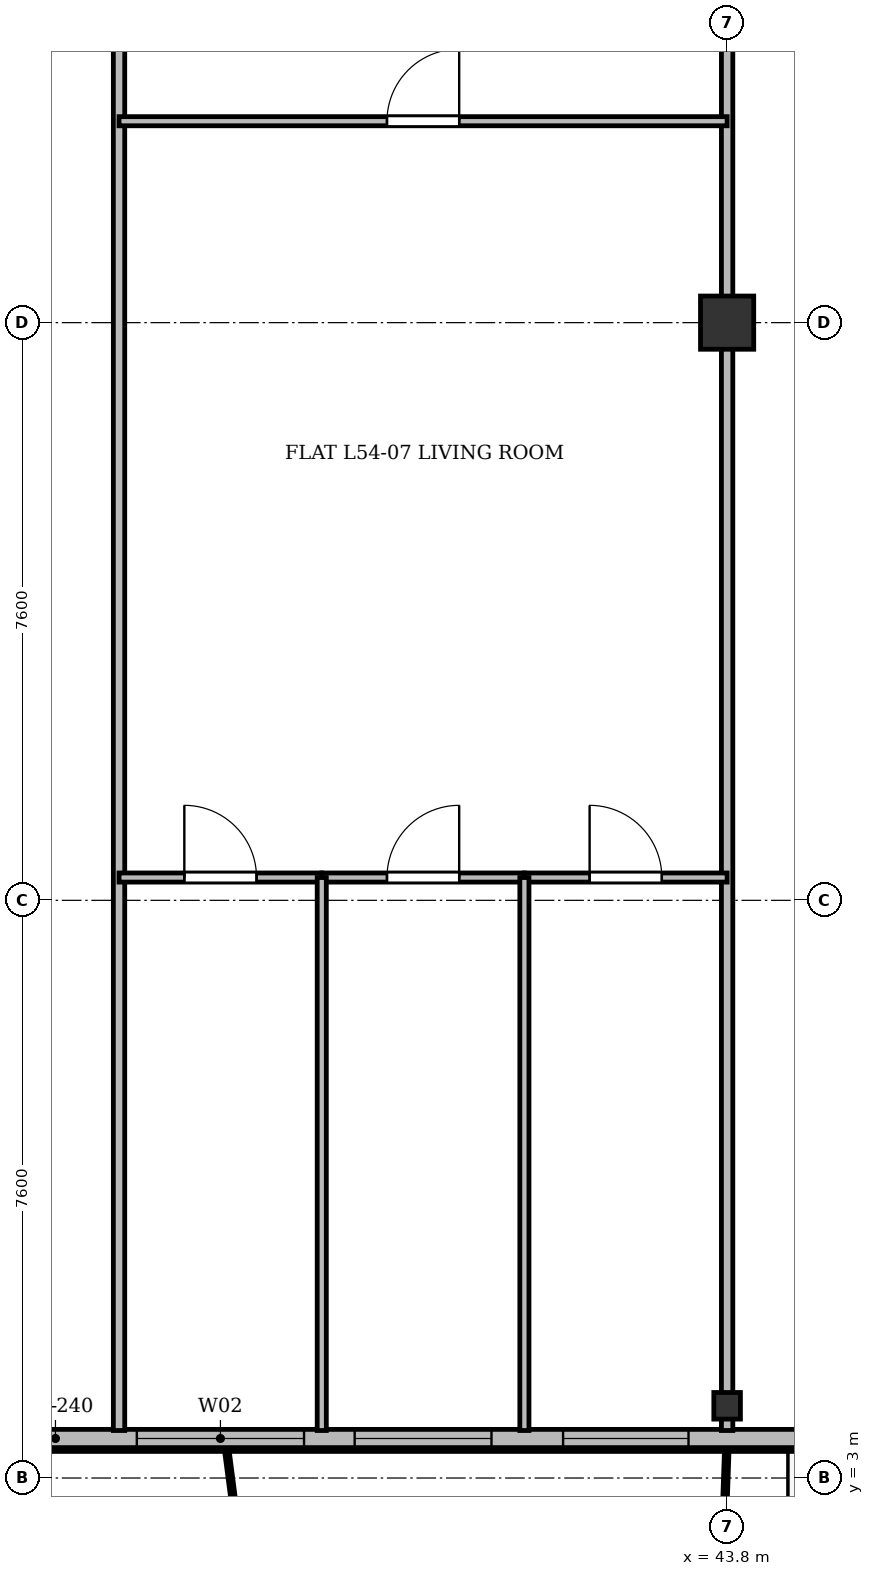
"""IFC4 building model, lengths in metres.
Left out: names, types, materials, properties, quantities, classifications, styles, units other than length and angle.
Written with IfcOpenShell. Run it as: python <this file> out.ifc"""

import sys

from ifc_helpers import new_model, si_unit, direction, frame, frame_2d, origin, origin_2d, place, context, subcontext, project, spatial, rectangle, i_section, extrude, source, transform, mapped, element, fill, save


model = new_model("IFC4")
c1 = context("Model", 3, precision=1e-05, world=origin(), true_north=direction((0.0, 1.0)))
c2 = subcontext(c1, "Body", "Model", "MODEL_VIEW")
j1 = project(units=[si_unit("LENGTHUNIT", "METRE"), si_unit("PLANEANGLEUNIT", "RADIAN")], contexts=[c1])
p1 = place(None, origin())
s1 = spatial("IfcSite", under=j1, at=p1, CompositionType="ELEMENT")
p2 = place(p1, origin())
s2 = spatial("IfcBuilding", under=s1, at=p2, CompositionType="ELEMENT")
p3 = place(p2, frame((0.0, 0.0, 208.5)))
s3 = spatial("IfcBuildingStorey", under=s2, at=p3, CompositionType="ELEMENT", Elevation=208.5)
m1 = source(origin(), c2, "Body", "SweptSolid", [
    extrude(i_section(OverallWidth=0.35, OverallDepth=0.35, WebThickness=0.018, FlangeThickness=0.028, at=origin_2d()), origin(), (0.0, 0.0, 1.0), 3.6),
])
p4 = place(p3, frame((43.8, 3.95, 0.0), z_axis=(0.0, 0.0, 1.0), x_axis=(1.0, 0.0, 0.0)))
e1 = element("IfcColumn", 1, at=p4, inside=s3, PredefinedType="COLUMN", context=c2, shape_type="MappedRepresentation", body=[
    mapped(m1, transform((0.0, 0.0, 0.0), x_axis=(1.0, 0.0, 0.0), y_axis=(0.0, 1.0, 0.0), z_axis=(0.0, 0.0, 1.0), scale=1.0)),
])
m2 = source(origin(), c2, "Body", "SweptSolid", [
    extrude(rectangle(XDim=0.7, YDim=0.7, at=origin_2d()), origin(), (0.0, 0.0, 1.0), 3.6),
])
p5 = place(p3, frame((43.8, 18.2, 0.0), z_axis=(0.0, 0.0, 1.0), x_axis=(1.0, 0.0, 0.0)))
e2 = element("IfcColumn", 2, at=p5, inside=s3, PredefinedType="COLUMN", context=c2, shape_type="MappedRepresentation", body=[
    mapped(m2, transform((0.0, 0.0, 0.0), x_axis=(1.0, 0.0, 0.0), y_axis=(0.0, 1.0, 0.0), z_axis=(0.0, 0.0, 1.0), scale=1.0)),
])
p6 = place(p3, frame((63.4, 3.52, 0.0), z_axis=(0.0, 0.0, 1.0), x_axis=(-1.0, 0.0, 0.0)))
e3 = element("IfcWall", 3, at=p6, inside=s3, PredefinedType="SOLIDWALL", context=c2, shape_type="SweptSolid", body=[
    extrude(rectangle(XDim=52.4, YDim=0.24, at=frame_2d((26.2, 0.0))), origin(), (0.0, 0.0, 1.0), 3.36),
])
p7 = place(p6, frame((1.52, 0.0, 0.9)))
e4 = element("IfcOpeningElement", 4, at=p7, cuts=e3, PredefinedType="OPENING", context=c2, shape_type="SweptSolid", body=[
    extrude(rectangle(XDim=1.65, YDim=1.85, at=frame_2d((0.825, 0.925))), frame((0.0, 0.13, 0.0), z_axis=(0.0, -1.0, 0.0), x_axis=(1.0, 0.0, 0.0)), (0.0, 0.0, 1.0), 0.26),
])
p8 = place(p6, frame((5.0, 0.0, 0.9)))
e5 = element("IfcOpeningElement", 5, at=p8, cuts=e3, PredefinedType="OPENING", context=c2, shape_type="SweptSolid", body=[
    extrude(rectangle(XDim=1.8, YDim=1.8, at=frame_2d((0.9, 0.9))), frame((0.0, 0.13, 0.0), z_axis=(0.0, -1.0, 0.0), x_axis=(1.0, 0.0, 0.0)), (0.0, 0.0, 1.0), 0.26),
])
p9 = place(p6, frame((7.45, 0.0, 0.9)))
e6 = element("IfcOpeningElement", 6, at=p9, cuts=e3, PredefinedType="OPENING", context=c2, shape_type="SweptSolid", body=[
    extrude(rectangle(XDim=1.5, YDim=1.75, at=frame_2d((0.75, 0.875))), frame((0.0, 0.13, 0.0), z_axis=(0.0, -1.0, 0.0), x_axis=(1.0, 0.0, 0.0)), (0.0, 0.0, 1.0), 0.26),
])
p10 = place(p6, frame((10.05, 0.0, 0.9)))
e7 = element("IfcOpeningElement", 7, at=p10, cuts=e3, PredefinedType="OPENING", context=c2, shape_type="SweptSolid", body=[
    extrude(rectangle(XDim=1.5, YDim=1.75, at=frame_2d((0.75, 0.875))), frame((0.0, 0.13, 0.0), z_axis=(0.0, -1.0, 0.0), x_axis=(1.0, 0.0, 0.0)), (0.0, 0.0, 1.0), 0.26),
])
p11 = place(p6, frame((14.217, 0.0, 0.0)))
e8 = element("IfcOpeningElement", 8, at=p11, cuts=e3, PredefinedType="OPENING", context=c2, shape_type="SweptSolid", body=[
    extrude(rectangle(XDim=1.2, YDim=2.2, at=frame_2d((0.6, 1.1))), frame((0.0, 0.13, 0.0), z_axis=(0.0, -1.0, 0.0), x_axis=(1.0, 0.0, 0.0)), (0.0, 0.0, 1.0), 0.26),
])
p12 = place(p6, frame((20.108, 0.0, 0.9)))
e9 = element("IfcOpeningElement", 9, at=p12, cuts=e3, PredefinedType="OPENING", context=c2, shape_type="SweptSolid", body=[
    extrude(rectangle(XDim=1.65, YDim=1.85, at=frame_2d((0.825, 0.925))), frame((0.0, 0.13, 0.0), z_axis=(0.0, -1.0, 0.0), x_axis=(1.0, 0.0, 0.0)), (0.0, 0.0, 1.0), 0.26),
])
p13 = place(p6, frame((22.7, 0.0, 0.9)))
e10 = element("IfcOpeningElement", 10, at=p13, cuts=e3, PredefinedType="OPENING", context=c2, shape_type="SweptSolid", body=[
    extrude(rectangle(XDim=1.8, YDim=1.8, at=frame_2d((0.9, 0.9))), frame((0.0, 0.13, 0.0), z_axis=(0.0, -1.0, 0.0), x_axis=(1.0, 0.0, 0.0)), (0.0, 0.0, 1.0), 0.26),
])
p14 = place(p6, frame((25.166, 0.0, 0.9)))
e11 = element("IfcOpeningElement", 11, at=p14, cuts=e3, PredefinedType="OPENING", context=c2, shape_type="SweptSolid", body=[
    extrude(rectangle(XDim=2.2, YDim=1.8, at=frame_2d((1.1, 0.9))), frame((0.0, 0.13, 0.0), z_axis=(0.0, -1.0, 0.0), x_axis=(1.0, 0.0, 0.0)), (0.0, 0.0, 1.0), 0.26),
])
p15 = place(p6, frame((29.45, 0.0, 0.9)))
e12 = element("IfcOpeningElement", 12, at=p15, cuts=e3, PredefinedType="OPENING", context=c2, shape_type="SweptSolid", body=[
    extrude(rectangle(XDim=1.5, YDim=1.75, at=frame_2d((0.75, 0.875))), frame((0.0, 0.13, 0.0), z_axis=(0.0, -1.0, 0.0), x_axis=(1.0, 0.0, 0.0)), (0.0, 0.0, 1.0), 0.26),
])
p16 = place(p6, frame((33.0, 0.0, 0.9)))
e13 = element("IfcOpeningElement", 13, at=p16, cuts=e3, PredefinedType="OPENING", context=c2, shape_type="SweptSolid", body=[
    extrude(rectangle(XDim=2.0, YDim=1.95, at=frame_2d((1.0, 0.975))), frame((0.0, 0.13, 0.0), z_axis=(0.0, -1.0, 0.0), x_axis=(1.0, 0.0, 0.0)), (0.0, 0.0, 1.0), 0.26),
])
p17 = place(p6, frame((35.575, 0.0, 0.9)))
e14 = element("IfcOpeningElement", 14, at=p17, cuts=e3, PredefinedType="OPENING", context=c2, shape_type="SweptSolid", body=[
    extrude(rectangle(XDim=1.65, YDim=1.85, at=frame_2d((0.825, 0.925))), frame((0.0, 0.13, 0.0), z_axis=(0.0, -1.0, 0.0), x_axis=(1.0, 0.0, 0.0)), (0.0, 0.0, 1.0), 0.26),
])
p18 = place(p6, frame((37.9, 0.0, 0.9)))
e15 = element("IfcOpeningElement", 15, at=p18, cuts=e3, PredefinedType="OPENING", context=c2, shape_type="SweptSolid", body=[
    extrude(rectangle(XDim=1.8, YDim=1.8, at=frame_2d((0.9, 0.9))), frame((0.0, 0.13, 0.0), z_axis=(0.0, -1.0, 0.0), x_axis=(1.0, 0.0, 0.0)), (0.0, 0.0, 1.0), 0.26),
])
p19 = place(p6, frame((41.456, 0.0, 0.0)))
e16 = element("IfcOpeningElement", 16, at=p19, cuts=e3, PredefinedType="OPENING", context=c2, shape_type="SweptSolid", body=[
    extrude(rectangle(XDim=1.2, YDim=2.2, at=frame_2d((0.6, 1.1))), frame((0.0, 0.13, 0.0), z_axis=(0.0, -1.0, 0.0), x_axis=(1.0, 0.0, 0.0)), (0.0, 0.0, 1.0), 0.26),
])
p20 = place(p6, frame((43.45, 0.0, 0.9)))
e17 = element("IfcOpeningElement", 17, at=p20, cuts=e3, PredefinedType="OPENING", context=c2, shape_type="SweptSolid", body=[
    extrude(rectangle(XDim=1.5, YDim=1.75, at=frame_2d((0.75, 0.875))), frame((0.0, 0.13, 0.0), z_axis=(0.0, -1.0, 0.0), x_axis=(1.0, 0.0, 0.0)), (0.0, 0.0, 1.0), 0.26),
])
p21 = place(p6, frame((45.5, 0.0, 0.9)))
e18 = element("IfcOpeningElement", 18, at=p21, cuts=e3, PredefinedType="OPENING", context=c2, shape_type="SweptSolid", body=[
    extrude(rectangle(XDim=2.0, YDim=1.95, at=frame_2d((1.0, 0.975))), frame((0.0, 0.13, 0.0), z_axis=(0.0, -1.0, 0.0), x_axis=(1.0, 0.0, 0.0)), (0.0, 0.0, 1.0), 0.26),
])
p22 = place(p6, frame((49.23, 0.0, 0.9)))
e19 = element("IfcOpeningElement", 19, at=p22, cuts=e3, PredefinedType="OPENING", context=c2, shape_type="SweptSolid", body=[
    extrude(rectangle(XDim=1.65, YDim=1.85, at=frame_2d((0.825, 0.925))), frame((0.0, 0.13, 0.0), z_axis=(0.0, -1.0, 0.0), x_axis=(1.0, 0.0, 0.0)), (0.0, 0.0, 1.0), 0.26),
])
p23 = place(p3, frame((35.8, 3.625, 0.0), z_axis=(0.0, 0.0, 1.0), x_axis=(0.0, 1.0, 0.0)))
e20 = element("IfcWall", 20, at=p23, inside=s3, PredefinedType="PARTITIONING", context=c2, shape_type="SweptSolid", body=[
    extrude(rectangle(XDim=27.175, YDim=0.15, at=frame_2d((13.587, 0.0))), origin(), (0.0, 0.0, 1.0), 2.91),
])
p24 = place(p3, frame((43.8, 3.625, 0.0), z_axis=(0.0, 0.0, 1.0), x_axis=(0.0, 1.0, 0.0)))
e21 = element("IfcWall", 21, at=p24, inside=s3, PredefinedType="PARTITIONING", context=c2, shape_type="SweptSolid", body=[
    extrude(rectangle(XDim=27.175, YDim=0.15, at=frame_2d((13.587, 0.0))), origin(), (0.0, 0.0, 1.0), 2.86),
])
p25 = place(p3, frame((35.8, 20.85, 0.0), z_axis=(0.0, 0.0, 1.0), x_axis=(1.0, 0.0, 0.0)))
e22 = element("IfcWall", 22, at=p25, inside=s3, PredefinedType="PARTITIONING", context=c2, shape_type="SweptSolid", body=[
    extrude(rectangle(XDim=8.0, YDim=0.12, at=frame_2d((4.0, 0.0))), origin(), (0.0, 0.0, 1.0), 2.86),
])
p26 = place(p25, frame((3.525, 0.0, 0.0)))
e23 = element("IfcOpeningElement", 23, at=p26, cuts=e22, PredefinedType="OPENING", context=c2, shape_type="SweptSolid", body=[
    extrude(rectangle(XDim=0.95, YDim=2.15, at=frame_2d((0.475, 1.075))), frame((0.0, 0.07, 0.0), z_axis=(0.0, -1.0, 0.0), x_axis=(1.0, 0.0, 0.0)), (0.0, 0.0, 1.0), 0.14),
])
p27 = place(p3, frame((35.8, 10.9, 0.0), z_axis=(0.0, 0.0, 1.0), x_axis=(1.0, 0.0, 0.0)))
e24 = element("IfcWall", 24, at=p27, inside=s3, PredefinedType="PARTITIONING", context=c2, shape_type="SweptSolid", body=[
    extrude(rectangle(XDim=2.667, YDim=0.12, at=frame_2d((1.333, 0.0))), origin(), (0.0, 0.0, 1.0), 3.36),
])
p28 = place(p27, frame((0.859, 0.0, 0.0)))
e25 = element("IfcOpeningElement", 25, at=p28, cuts=e24, PredefinedType="OPENING", context=c2, shape_type="SweptSolid", body=[
    extrude(rectangle(XDim=0.95, YDim=2.15, at=frame_2d((0.475, 1.075))), frame((0.0, 0.07, 0.0), z_axis=(0.0, -1.0, 0.0), x_axis=(1.0, 0.0, 0.0)), (0.0, 0.0, 1.0), 0.14),
])
p29 = place(p3, frame((38.467, 10.9, 0.0), z_axis=(0.0, 0.0, 1.0), x_axis=(1.0, 0.0, 0.0)))
e26 = element("IfcWall", 26, at=p29, inside=s3, PredefinedType="PARTITIONING", context=c2, shape_type="SweptSolid", body=[
    extrude(rectangle(XDim=2.666, YDim=0.12, at=frame_2d((1.333, 0.0))), origin(), (0.0, 0.0, 1.0), 3.36),
])
p30 = place(p29, frame((0.858, 0.0, 0.0)))
e27 = element("IfcOpeningElement", 27, at=p30, cuts=e26, PredefinedType="OPENING", context=c2, shape_type="SweptSolid", body=[
    extrude(rectangle(XDim=0.95, YDim=2.15, at=frame_2d((0.475, 1.075))), frame((0.0, 0.07, 0.0), z_axis=(0.0, -1.0, 0.0), x_axis=(1.0, 0.0, 0.0)), (0.0, 0.0, 1.0), 0.14),
])
p31 = place(p3, frame((38.467, 3.625, 0.0), z_axis=(0.0, 0.0, 1.0), x_axis=(0.0, 1.0, 0.0)))
e28 = element("IfcWall", 28, at=p31, inside=s3, PredefinedType="PARTITIONING", context=c2, shape_type="SweptSolid", body=[
    extrude(rectangle(XDim=7.275, YDim=0.12, at=frame_2d((3.637, 0.0))), origin(), (0.0, 0.0, 1.0), 2.91),
])
p32 = place(p3, frame((41.133, 10.9, 0.0), z_axis=(0.0, 0.0, 1.0), x_axis=(1.0, 0.0, 0.0)))
e29 = element("IfcWall", 29, at=p32, inside=s3, PredefinedType="PARTITIONING", context=c2, shape_type="SweptSolid", body=[
    extrude(rectangle(XDim=2.667, YDim=0.12, at=frame_2d((1.333, 0.0))), origin(), (0.0, 0.0, 1.0), 2.86),
])
p33 = place(p32, frame((0.858, 0.0, 0.0)))
e30 = element("IfcOpeningElement", 30, at=p33, cuts=e29, PredefinedType="OPENING", context=c2, shape_type="SweptSolid", body=[
    extrude(rectangle(XDim=0.95, YDim=2.15, at=frame_2d((0.475, 1.075))), frame((0.0, 0.07, 0.0), z_axis=(0.0, -1.0, 0.0), x_axis=(1.0, 0.0, 0.0)), (0.0, 0.0, 1.0), 0.14),
])
p34 = place(p3, frame((41.133, 3.625, 0.0), z_axis=(0.0, 0.0, 1.0), x_axis=(0.0, 1.0, 0.0)))
e31 = element("IfcWall", 31, at=p34, inside=s3, PredefinedType="PARTITIONING", context=c2, shape_type="SweptSolid", body=[
    extrude(rectangle(XDim=7.275, YDim=0.12, at=frame_2d((3.637, 0.0))), origin(), (0.0, 0.0, 1.0), 2.91),
])
m3 = source(origin(), c2, "Body", "SweptSolid", [
    extrude(rectangle(XDim=1.65, YDim=1.85, at=frame_2d((0.825, 0.925))), frame((0.0, 0.03, 0.0), z_axis=(0.0, -1.0, 0.0), x_axis=(1.0, 0.0, 0.0)), (0.0, 0.0, 1.0), 0.06),
])
p35 = place(p12, origin())
e32 = element("IfcWindow", 32, at=p35, inside=s3, PartitioningType="SINGLE_PANEL", PredefinedType="WINDOW", context=c2, shape_type="MappedRepresentation", body=[
    mapped(m3, transform((0.0, 0.0, 0.0), x_axis=(1.0, 0.0, 0.0), y_axis=(0.0, 1.0, 0.0), z_axis=(0.0, 0.0, 1.0), scale=1.0)),
])
fill(e9, e32)
m4 = source(origin(), c2, "Body", "SweptSolid", [
    extrude(rectangle(XDim=1.8, YDim=1.8, at=frame_2d((0.9, 0.9))), frame((0.0, 0.03, 0.0), z_axis=(0.0, -1.0, 0.0), x_axis=(1.0, 0.0, 0.0)), (0.0, 0.0, 1.0), 0.06),
])
p36 = place(p13, origin())
e33 = element("IfcWindow", 33, at=p36, inside=s3, PartitioningType="SINGLE_PANEL", PredefinedType="WINDOW", context=c2, shape_type="MappedRepresentation", body=[
    mapped(m4, transform((0.0, 0.0, 0.0), x_axis=(1.0, 0.0, 0.0), y_axis=(0.0, 1.0, 0.0), z_axis=(0.0, 0.0, 1.0), scale=1.0)),
])
fill(e10, e33)
m5 = source(origin(), c2, "Body", "SweptSolid", [
    extrude(rectangle(XDim=2.2, YDim=1.8, at=frame_2d((1.1, 0.9))), frame((0.0, 0.03, 0.0), z_axis=(0.0, -1.0, 0.0), x_axis=(1.0, 0.0, 0.0)), (0.0, 0.0, 1.0), 0.06),
])
p37 = place(p14, origin())
e34 = element("IfcWindow", 34, at=p37, inside=s3, PartitioningType="SINGLE_PANEL", PredefinedType="WINDOW", context=c2, shape_type="MappedRepresentation", body=[
    mapped(m5, transform((0.0, 0.0, 0.0), x_axis=(1.0, 0.0, 0.0), y_axis=(0.0, 1.0, 0.0), z_axis=(0.0, 0.0, 1.0), scale=1.0)),
])
fill(e11, e34)
m6 = source(origin(), c2, "Body", "SweptSolid", [
    extrude(rectangle(XDim=0.95, YDim=2.15, at=frame_2d((0.475, 1.075))), frame((0.0, 0.025, 0.0), z_axis=(0.0, -1.0, 0.0), x_axis=(1.0, 0.0, 0.0)), (0.0, 0.0, 1.0), 0.05),
])
p38 = place(p26, origin())
e35 = element("IfcDoor", 35, at=p38, inside=s3, OperationType="SINGLE_SWING_RIGHT", PredefinedType="DOOR", context=c2, shape_type="MappedRepresentation", body=[
    mapped(m6, transform((0.0, 0.0, 0.0), x_axis=(1.0, 0.0, 0.0), y_axis=(0.0, 1.0, 0.0), z_axis=(0.0, 0.0, 1.0), scale=1.0)),
])
fill(e23, e35)
p39 = place(p28, origin())
e36 = element("IfcDoor", 36, at=p39, inside=s3, OperationType="SINGLE_SWING_LEFT", PredefinedType="DOOR", context=c2, shape_type="MappedRepresentation", body=[
    mapped(m6, transform((0.0, 0.0, 0.0), x_axis=(1.0, 0.0, 0.0), y_axis=(0.0, 1.0, 0.0), z_axis=(0.0, 0.0, 1.0), scale=1.0)),
])
fill(e25, e36)
p40 = place(p30, origin())
e37 = element("IfcDoor", 37, at=p40, inside=s3, OperationType="SINGLE_SWING_RIGHT", PredefinedType="DOOR", context=c2, shape_type="MappedRepresentation", body=[
    mapped(m6, transform((0.0, 0.0, 0.0), x_axis=(1.0, 0.0, 0.0), y_axis=(0.0, 1.0, 0.0), z_axis=(0.0, 0.0, 1.0), scale=1.0)),
])
fill(e27, e37)
p41 = place(p33, origin())
e38 = element("IfcDoor", 38, at=p41, inside=s3, OperationType="SINGLE_SWING_LEFT", PredefinedType="DOOR", context=c2, shape_type="MappedRepresentation", body=[
    mapped(m6, transform((0.0, 0.0, 0.0), x_axis=(1.0, 0.0, 0.0), y_axis=(0.0, 1.0, 0.0), z_axis=(0.0, 0.0, 1.0), scale=1.0)),
])
fill(e30, e38)
save(model, sys.argv[1])
